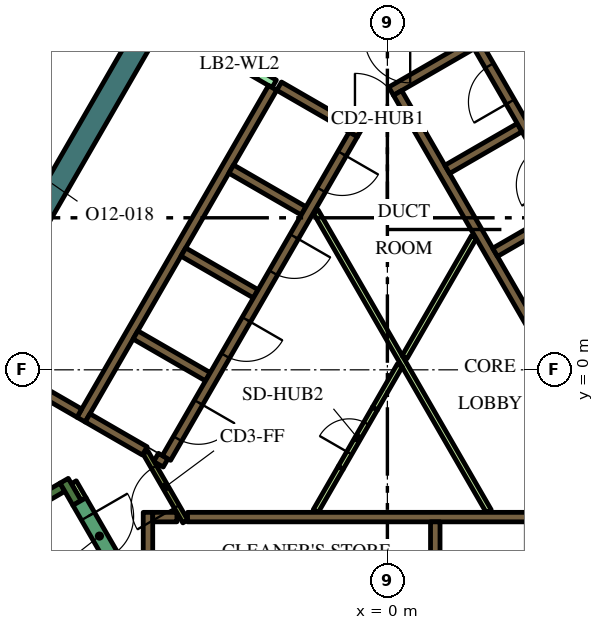
"""IFC4 building model, lengths in metres.
Left out: names, types, materials, properties, quantities, classifications, styles, units other than length and angle.
Written with IfcOpenShell. Run it as: python <this file> out.ifc"""

import sys

from ifc_helpers import new_model, si_unit, direction, frame, frame_2d, origin, place, context, subcontext, project, spatial, polyline, rectangle, outline, extrude, element, fill, save


model = new_model("IFC4")
c1 = context("Model", 3, precision=1e-05, world=origin(), true_north=direction((0.0, 1.0)))
c2 = subcontext(c1, "Body", "Model", "MODEL_VIEW")
j1 = project(units=[si_unit("LENGTHUNIT", "METRE"), si_unit("PLANEANGLEUNIT", "RADIAN")], contexts=[c1])
p1 = place(None, origin())
s1 = spatial("IfcSite", under=j1, at=p1, CompositionType="ELEMENT")
p2 = place(p1, origin())
s2 = spatial("IfcBuilding", under=s1, at=p2, CompositionType="ELEMENT")
p3 = place(p2, frame((0.0, 0.0, 279.6)))
s3 = spatial("IfcBuildingStorey", under=s2, at=p3, CompositionType="ELEMENT", Elevation=279.6)
p4 = place(p3, frame((1.989, 16.456, 0.0), z_axis=(0.0, 0.0, 1.0), x_axis=(0.49999102663, -0.8660305845, 0.0)))
e1 = element("IfcWall", 1, at=p4, inside=s3, PredefinedType="SOLIDWALL", context=c2, shape_type="SweptSolid", body=[
    extrude(rectangle(XDim=12.406, YDim=0.6, at=frame_2d((6.203, 0.0))), origin(), (0.0, 0.0, 1.0), 4.2),
])
p5 = place(p3, frame((-4.234, 12.566, 0.0), z_axis=(0.0, 0.0, 1.0), x_axis=(-0.499998841866, -0.866026072432, 0.0)))
e2 = element("IfcWall", 2, at=p5, inside=s3, PredefinedType="SOLIDWALL", context=c2, shape_type="SweptSolid", body=[
    extrude(rectangle(XDim=16.694, YDim=0.6, at=frame_2d((8.347, 0.0))), origin(), (0.0, 0.0, 1.0), 4.2),
])
p6 = place(p3, frame((-14.44, -6.49, 0.0), z_axis=(0.0, 0.0, 1.0), x_axis=(0.866022966069, 0.500004222222, 0.0)))
e3 = element("IfcWall", 3, at=p6, inside=s3, PredefinedType="SOLIDWALL", context=c2, shape_type="SweptSolid", body=[
    extrude(rectangle(XDim=6.8, YDim=0.25, at=frame_2d((3.4, 0.0))), origin(), (0.0, 0.0, 1.0), 4.2),
])
p7 = place(p3, frame((-8.168, -3.503, 0.0), z_axis=(0.0, 0.0, 1.0), x_axis=(-0.499952099219, 0.866053057547, 0.0)))
e4 = element("IfcWall", 4, at=p7, inside=s3, PredefinedType="SOLIDWALL", context=c2, shape_type="SweptSolid", body=[
    extrude(rectangle(XDim=0.675, YDim=0.25, at=frame_2d((0.337, 0.0))), origin(), (0.0, 0.0, 1.0), 4.2),
])
p8 = place(p3, frame((-5.259, -3.875, 0.0), z_axis=(0.0, 0.0, 1.0), x_axis=(1.0, 0.0, 0.0)))
e5 = element("IfcWall", 5, at=p8, inside=s3, PredefinedType="SOLIDWALL", context=c2, shape_type="SweptSolid", body=[
    extrude(rectangle(XDim=10.489, YDim=0.25, at=frame_2d((5.244, 0.0))), origin(), (0.0, 0.0, 1.0), 4.2),
])
p9 = place(p3, frame((1.26, -4.0, 0.0), z_axis=(0.0, 0.0, 1.0), x_axis=(0.0, -1.0, 0.0)))
e6 = element("IfcWall", 6, at=p9, inside=s3, PredefinedType="SOLIDWALL", context=c2, shape_type="SweptSolid", body=[
    extrude(rectangle(XDim=2.2, YDim=0.25, at=frame_2d((1.1, 0.0))), origin(), (0.0, 0.0, 1.0), 4.2),
])
p10 = place(p3, frame((-6.3, -7.125, 0.0), z_axis=(0.0, 0.0, 1.0), x_axis=(0.0, 1.0, 0.0)))
e7 = element("IfcWall", 7, at=p10, inside=s3, PredefinedType="SOLIDWALL", context=c2, shape_type="SweptSolid", body=[
    extrude(rectangle(XDim=3.375, YDim=0.25, at=frame_2d((1.687, 0.0))), origin(), (0.0, 0.0, 1.0), 4.2),
])
p11 = place(p3, frame((-6.175, -3.875, 0.0), z_axis=(0.0, 0.0, 1.0), x_axis=(1.0, 0.0, 0.0)))
e8 = element("IfcWall", 8, at=p11, inside=s3, PredefinedType="SOLIDWALL", context=c2, shape_type="SweptSolid", body=[
    extrude(rectangle(XDim=0.637, YDim=0.25, at=frame_2d((0.318, 0.0))), origin(), (0.0, 0.0, 1.0), 4.2),
])
p12 = place(p3, frame((3.1, 9.064, 0.0), z_axis=(0.0, 0.0, 1.0), x_axis=(-0.866033137035, -0.499986605379, 0.0)))
e9 = element("IfcWall", 9, at=p12, inside=s3, PredefinedType="SOLIDWALL", context=c2, shape_type="SweptSolid", body=[
    extrude(rectangle(XDim=3.467, YDim=0.25, at=frame_2d((1.733, 0.0))), origin(), (0.0, 0.0, 1.0), 4.2),
])
p13 = place(p3, frame((0.268, 7.285, 0.0), z_axis=(0.0, 0.0, 1.0), x_axis=(0.500098681536, -0.865968422476, 0.0)))
e10 = element("IfcWall", 10, at=p13, inside=s3, PredefinedType="SOLIDWALL", context=c2, shape_type="SweptSolid", body=[
    extrude(rectangle(XDim=0.636, YDim=0.25, at=frame_2d((0.318, 0.0))), origin(), (0.0, 0.0, 1.0), 4.2),
])
p14 = place(p3, frame((5.97, -2.591, 0.0), z_axis=(0.0, 0.0, 1.0), x_axis=(-0.499994469932, 0.866028596547, 0.0)))
e11 = element("IfcWall", 11, at=p14, inside=s3, PredefinedType="SOLIDWALL", context=c2, shape_type="SweptSolid", body=[
    extrude(rectangle(XDim=10.488, YDim=0.25, at=frame_2d((5.244, 0.0))), origin(), (0.0, 0.0, 1.0), 4.2),
])
p15 = place(p3, frame((1.574, 5.274, 0.0), z_axis=(0.0, 0.0, 1.0), x_axis=(0.866028486751, 0.499994660107, 0.0)))
e12 = element("IfcWall", 12, at=p15, inside=s3, PredefinedType="SOLIDWALL", context=c2, shape_type="SweptSolid", body=[
    extrude(rectangle(XDim=2.2, YDim=0.25, at=frame_2d((1.1, 0.0))), origin(), (0.0, 0.0, 1.0), 4.2),
])
p16 = place(p3, frame((2.834, 3.091, 0.0), z_axis=(0.0, 0.0, 1.0), x_axis=(0.866008176907, 0.50002983664, 0.0)))
e13 = element("IfcWall", 13, at=p16, inside=s3, PredefinedType="SOLIDWALL", context=c2, shape_type="SweptSolid", body=[
    extrude(rectangle(XDim=2.2, YDim=0.25, at=frame_2d((1.1, 0.0))), origin(), (0.0, 0.0, 1.0), 4.2),
])
p17 = place(p3, frame((-3.02, 7.419, 0.0), z_axis=(0.0, 0.0, 1.0), x_axis=(-0.500022956343, -0.866012149528, 0.0)))
e14 = element("IfcWall", 14, at=p17, inside=s3, PredefinedType="SOLIDWALL", context=c2, shape_type="SweptSolid", body=[
    extrude(rectangle(XDim=10.08, YDim=0.25, at=frame_2d((5.04, 0.0))), origin(), (0.0, 0.0, 1.0), 4.2),
])
p18 = place(p3, origin())
e15 = element("IfcWall", 15, at=p18, inside=s3, PredefinedType="SOLIDWALL", context=c2, shape_type="SweptSolid", body=[
    extrude(outline(polyline([(-2.912, 7.356), (-2.787, 7.573), (-1.232, 6.675), (-1.303, 6.675), (-1.304, 6.675), (-1.304, 6.675), (-1.304, 6.525), (-1.304, 6.525), (-1.303, 6.525), (-0.971, 6.525), (-0.665, 6.348), (-0.79, 6.132), (-1.007, 6.257), (-1.007, 6.257), (-2.912, 7.356)])), origin(), (0.0, 0.0, 1.0), 4.2),
])
for number, where, z_axis, x_axis in (
    (16, (-2.204, 4.182, 0.0), (0.0, 0.0, 1.0), (-0.866, 0.5, 0.0)),
    (17, (-5.369, 3.1, 0.0), (0.0, 0.0, 1.0), (0.866, -0.5, 0.0)),
    (18, (-4.724, -0.182, 0.0), (0.0, 0.0, 1.0), (-0.866, 0.5, 0.0)),
):
    element("IfcWall", number, at=place(p3, frame(where, z_axis=z_axis, x_axis=x_axis)), inside=s3, PredefinedType="SOLIDWALL", context=c2, shape_type="SweptSolid", body=[
        extrude(rectangle(XDim=2.2, YDim=0.25, at=frame_2d((1.1, 0.0))), origin(), (0.0, 0.0, 1.0), 4.2),
    ])
p19 = place(p3, frame((-6.088, -2.305, 0.0), z_axis=(0.0, 0.0, 1.0), x_axis=(0.866059450854, -0.499941024108, 0.0)))
e19 = element("IfcWall", 19, at=p19, inside=s3, PredefinedType="SOLIDWALL", context=c2, shape_type="SweptSolid", body=[
    extrude(rectangle(XDim=0.29, YDim=0.25, at=frame_2d((0.145, 0.0))), origin(), (0.0, 0.0, 1.0), 4.2),
])
p20 = place(p3, frame((-7.889, -1.265, 0.0), z_axis=(0.0, 0.0, 1.0), x_axis=(0.865986741702, -0.500066958712, 0.0)))
e20 = element("IfcWall", 20, at=p20, inside=s3, PredefinedType="SOLIDWALL", context=c2, shape_type="SweptSolid", body=[
    extrude(rectangle(XDim=1.738, YDim=0.25, at=frame_2d((0.869, 0.0))), origin(), (0.0, 0.0, 1.0), 4.2),
])
p21 = place(p3, frame((-8.106, -1.14, 0.0), z_axis=(0.0, 0.0, 1.0), x_axis=(-0.866008981251, 0.500028443584, 0.0)))
e21 = element("IfcWall", 21, at=p21, inside=s3, PredefinedType="SOLIDWALL", context=c2, shape_type="SweptSolid", body=[
    extrude(rectangle(XDim=3.2, YDim=0.25, at=frame_2d((1.6, 0.0))), origin(), (0.0, 0.0, 1.0), 4.2),
])
p22 = place(p3, frame((-8.252, -2.958, 0.0), z_axis=(0.0, 0.0, 1.0), x_axis=(0.500174715838, -0.865924508047, 0.0)))
e22 = element("IfcWall", 22, at=p22, inside=s3, PredefinedType="PARTITIONING", context=c2, shape_type="SweptSolid", body=[
    extrude(rectangle(XDim=0.514, YDim=0.15, at=frame_2d((0.257, 0.0))), origin(), (0.0, 0.0, 1.0), 3.55),
])
p23 = place(p3, frame((-1.887, 4.168, 0.0), z_axis=(0.0, 0.0, 1.0), x_axis=(0.499997069472, -0.866027095719, 0.0)))
e23 = element("IfcWall", 23, at=p23, inside=s3, PredefinedType="PARTITIONING", context=c2, shape_type="SweptSolid", body=[
    extrude(rectangle(XDim=9.106, YDim=0.15, at=frame_2d((4.553, 0.0))), origin(), (0.0, 0.0, 1.0), 3.55),
])
p24 = place(p3, frame((-0.329, -1.021, 0.0), z_axis=(0.0, 0.0, 1.0), x_axis=(0.500033191285, 0.866006239939, 0.0)))
e24 = element("IfcWall", 24, at=p24, inside=s3, PredefinedType="PARTITIONING", context=c2, shape_type="SweptSolid", body=[
    extrude(rectangle(XDim=1.315, YDim=0.15, at=frame_2d((0.657, 0.0))), origin(), (0.0, 0.0, 1.0), 3.55),
])
p25 = place(p3, frame((2.277, 3.493, 0.0), z_axis=(0.0, 0.0, 1.0), x_axis=(-0.499994550825, -0.866028549844, 0.0)))
e25 = element("IfcWall", 25, at=p25, inside=s3, PredefinedType="PARTITIONING", context=c2, shape_type="SweptSolid", body=[
    extrude(rectangle(XDim=3.65, YDim=0.15, at=frame_2d((1.825, 0.0))), origin(), (0.0, 0.0, 1.0), 3.55),
])
p26 = place(p3, frame((-1.887, -3.718, 0.0), z_axis=(0.0, 0.0, 1.0), x_axis=(0.500033191285, 0.866006239939, 0.0)))
e26 = element("IfcWall", 26, at=p26, inside=s3, PredefinedType="PARTITIONING", context=c2, shape_type="SweptSolid", body=[
    extrude(rectangle(XDim=1.315, YDim=0.15, at=frame_2d((0.657, 0.0))), origin(), (0.0, 0.0, 1.0), 3.55),
])
p27 = place(p3, frame((8.565, -2.185, 0.0), z_axis=(0.0, 0.0, 1.0), x_axis=(-0.499997954832, 0.866026584559, 0.0)))
e27 = element("IfcWall", 27, at=p27, inside=s3, PredefinedType="SOLIDWALL", context=c2, shape_type="SweptSolid", body=[
    extrude(rectangle(XDim=12.35, YDim=0.25, at=frame_2d((6.175, 0.0))), origin(), (0.0, 0.0, 1.0), 4.2),
])
p28 = place(p27, frame((0.685, 0.0, 0.0)))
e28 = element("IfcOpeningElement", 28, at=p28, cuts=e27, PredefinedType="OPENING", context=c2, shape_type="SweptSolid", body=[
    extrude(rectangle(XDim=0.9, YDim=2.1, at=frame_2d((0.45, 1.05))), frame((0.0, 0.135, 0.0), z_axis=(0.0, -1.0, 0.0), x_axis=(1.0, 0.0, 0.0)), (0.0, 0.0, 1.0), 0.27),
])
p29 = place(p27, frame((3.105, 0.0, 0.0)))
e29 = element("IfcOpeningElement", 29, at=p29, cuts=e27, PredefinedType="OPENING", context=c2, shape_type="SweptSolid", body=[
    extrude(rectangle(XDim=1.1, YDim=2.1, at=frame_2d((0.55, 1.05))), frame((0.0, 0.135, 0.0), z_axis=(0.0, -1.0, 0.0), x_axis=(1.0, 0.0, 0.0)), (0.0, 0.0, 1.0), 0.27),
])
p30 = place(p27, frame((5.625, 0.0, 0.0)))
e30 = element("IfcOpeningElement", 30, at=p30, cuts=e27, PredefinedType="OPENING", context=c2, shape_type="SweptSolid", body=[
    extrude(rectangle(XDim=1.1, YDim=2.1, at=frame_2d((0.55, 1.05))), frame((0.0, 0.135, 0.0), z_axis=(0.0, -1.0, 0.0), x_axis=(1.0, 0.0, 0.0)), (0.0, 0.0, 1.0), 0.27),
])
p31 = place(p27, frame((8.145, 0.0, 0.0)))
e31 = element("IfcOpeningElement", 31, at=p31, cuts=e27, PredefinedType="OPENING", context=c2, shape_type="SweptSolid", body=[
    extrude(rectangle(XDim=1.1, YDim=2.1, at=frame_2d((0.55, 1.05))), frame((0.0, 0.135, 0.0), z_axis=(0.0, -1.0, 0.0), x_axis=(1.0, 0.0, 0.0)), (0.0, 0.0, 1.0), 0.27),
])
p32 = place(p27, frame((10.665, 0.0, 0.0)))
e32 = element("IfcOpeningElement", 32, at=p32, cuts=e27, PredefinedType="OPENING", context=c2, shape_type="SweptSolid", body=[
    extrude(rectangle(XDim=1.1, YDim=2.1, at=frame_2d((0.55, 1.05))), frame((0.0, 0.135, 0.0), z_axis=(0.0, -1.0, 0.0), x_axis=(1.0, 0.0, 0.0)), (0.0, 0.0, 1.0), 0.27),
])
p33 = place(p3, frame((-0.898, 6.194, 0.0), z_axis=(0.0, 0.0, 1.0), x_axis=(-0.499996202215, -0.866027596426, 0.0)))
e33 = element("IfcWall", 33, at=p33, inside=s3, PredefinedType="SOLIDWALL", context=c2, shape_type="SweptSolid", body=[
    extrude(rectangle(XDim=9.83, YDim=0.25, at=frame_2d((4.915, 0.0))), origin(), (0.0, 0.0, 1.0), 4.2),
])
p34 = place(p33, frame((0.585, 0.0, 0.0)))
e34 = element("IfcOpeningElement", 34, at=p34, cuts=e33, PredefinedType="OPENING", context=c2, shape_type="SweptSolid", body=[
    extrude(rectangle(XDim=1.1, YDim=2.1, at=frame_2d((0.55, 1.05))), frame((0.0, 0.135, 0.0), z_axis=(0.0, -1.0, 0.0), x_axis=(1.0, 0.0, 0.0)), (0.0, 0.0, 1.0), 0.27),
])
p35 = place(p33, frame((3.105, 0.0, 0.0)))
e35 = element("IfcOpeningElement", 35, at=p35, cuts=e33, PredefinedType="OPENING", context=c2, shape_type="SweptSolid", body=[
    extrude(rectangle(XDim=1.1, YDim=2.1, at=frame_2d((0.55, 1.05))), frame((0.0, 0.135, 0.0), z_axis=(0.0, -1.0, 0.0), x_axis=(1.0, 0.0, 0.0)), (0.0, 0.0, 1.0), 0.27),
])
p36 = place(p33, frame((5.625, 0.0, 0.0)))
e36 = element("IfcOpeningElement", 36, at=p36, cuts=e33, PredefinedType="OPENING", context=c2, shape_type="SweptSolid", body=[
    extrude(rectangle(XDim=1.1, YDim=2.1, at=frame_2d((0.55, 1.05))), frame((0.0, 0.135, 0.0), z_axis=(0.0, -1.0, 0.0), x_axis=(1.0, 0.0, 0.0)), (0.0, 0.0, 1.0), 0.27),
])
p37 = place(p33, frame((8.145, 0.0, 0.0)))
e37 = element("IfcOpeningElement", 37, at=p37, cuts=e33, PredefinedType="OPENING", context=c2, shape_type="SweptSolid", body=[
    extrude(rectangle(XDim=1.1, YDim=2.1, at=frame_2d((0.55, 1.05))), frame((0.0, 0.135, 0.0), z_axis=(0.0, -1.0, 0.0), x_axis=(1.0, 0.0, 0.0)), (0.0, 0.0, 1.0), 0.27),
])
p38 = place(p3, frame((-8.103, -3.466, 0.0), z_axis=(0.0, 0.0, 1.0), x_axis=(0.500078061341, -0.865980330357, 0.0)))
e38 = element("IfcWall", 38, at=p38, inside=s3, PredefinedType="SOLIDWALL", context=c2, shape_type="SweptSolid", body=[
    extrude(rectangle(XDim=2.1, YDim=0.4, at=frame_2d((1.05, 0.0))), origin(), (0.0, 0.0, 1.0), 4.2),
])
p39 = place(p38, frame((0.45, 0.0, 0.0)))
e39 = element("IfcOpeningElement", 39, at=p39, cuts=e38, PredefinedType="OPENING", context=c2, shape_type="SweptSolid", body=[
    extrude(rectangle(XDim=1.2, YDim=2.1, at=frame_2d((0.6, 1.05))), frame((0.0, 0.21, 0.0), z_axis=(0.0, -1.0, 0.0), x_axis=(1.0, 0.0, 0.0)), (0.0, 0.0, 1.0), 0.42),
])
p40 = place(p3, frame((-1.303, 6.6, 0.0), z_axis=(0.0, 0.0, 1.0), x_axis=(1.0, 0.0, 0.0)))
e40 = element("IfcWall", 40, at=p40, inside=s3, PredefinedType="PARTITIONING", context=c2, shape_type="SweptSolid", body=[
    extrude(rectangle(XDim=2.1, YDim=0.15, at=frame_2d((1.05, 0.0))), origin(), (0.0, 0.0, 1.0), 4.2),
])
p41 = place(p40, frame((0.45, 0.0, 0.0)))
e41 = element("IfcOpeningElement", 41, at=p41, cuts=e40, PredefinedType="OPENING", context=c2, shape_type="SweptSolid", body=[
    extrude(rectangle(XDim=1.2, YDim=2.1, at=frame_2d((0.6, 1.05))), frame((0.0, 0.085, 0.0), z_axis=(0.0, -1.0, 0.0), x_axis=(1.0, 0.0, 0.0)), (0.0, 0.0, 1.0), 0.17),
])
p42 = place(p3, frame((-5.317, -3.99, 0.0), z_axis=(0.0, 0.0, 1.0), x_axis=(-0.500027713859, 0.866009402589, 0.0)))
e42 = element("IfcWall", 42, at=p42, inside=s3, PredefinedType="PARTITIONING", context=c2, shape_type="SweptSolid", body=[
    extrude(rectangle(XDim=2.1, YDim=0.15, at=frame_2d((1.05, 0.0))), origin(), (0.0, 0.0, 1.0), 4.2),
])
p43 = place(p42, frame((0.45, 0.0, 0.0)))
e43 = element("IfcOpeningElement", 43, at=p43, cuts=e42, PredefinedType="OPENING", context=c2, shape_type="SweptSolid", body=[
    extrude(rectangle(XDim=1.2, YDim=2.1, at=frame_2d((0.6, 1.05))), frame((0.0, 0.085, 0.0), z_axis=(0.0, -1.0, 0.0), x_axis=(1.0, 0.0, 0.0)), (0.0, 0.0, 1.0), 0.17),
])
p44 = place(p3, frame((-4.796, 8.575, 0.0), z_axis=(0.0, 0.0, 1.0), x_axis=(0.866009402589, -0.500027713859, 0.0)))
e44 = element("IfcWall", 44, at=p44, inside=s3, PredefinedType="PARTITIONING", context=c2, shape_type="SweptSolid", body=[
    extrude(rectangle(XDim=2.1, YDim=0.226, at=frame_2d((1.05, 0.0))), origin(), (0.0, 0.0, 1.0), 3.55),
])
p45 = place(p44, frame((0.45, 0.0, 0.0)))
e45 = element("IfcOpeningElement", 45, at=p45, cuts=e44, PredefinedType="OPENING", context=c2, shape_type="SweptSolid", body=[
    extrude(rectangle(XDim=1.2, YDim=2.1, at=frame_2d((0.6, 1.05))), frame((0.0, 0.123, 0.0), z_axis=(0.0, -1.0, 0.0), x_axis=(1.0, 0.0, 0.0)), (0.0, 0.0, 1.0), 0.246),
])
p46 = place(p3, frame((-1.229, -2.579, 0.0), z_axis=(0.0, 0.0, 1.0), x_axis=(0.500062916607, 0.865989075817, 0.0)))
e46 = element("IfcWall", 46, at=p46, inside=s3, PredefinedType="PARTITIONING", context=c2, shape_type="SweptSolid", body=[
    extrude(rectangle(XDim=1.8, YDim=0.15, at=frame_2d((0.9, 0.0))), origin(), (0.0, 0.0, 1.0), 3.55),
])
p47 = place(p46, frame((0.45, 0.0, 0.0)))
e47 = element("IfcOpeningElement", 47, at=p47, cuts=e46, PredefinedType="OPENING", context=c2, shape_type="SweptSolid", body=[
    extrude(rectangle(XDim=0.9, YDim=2.1, at=frame_2d((0.45, 1.05))), frame((0.0, 0.085, 0.0), z_axis=(0.0, -1.0, 0.0), x_axis=(1.0, 0.0, 0.0)), (0.0, 0.0, 1.0), 0.17),
])
p48 = place(p3, frame((-7.436, 11.221, 0.0), z_axis=(0.0, 0.0, 1.0), x_axis=(-0.49999894854, -0.866026010844, 0.0)))
e48 = element("IfcWall", 48, at=p48, inside=s3, PredefinedType="PARTITIONING", context=c2, shape_type="SweptSolid", body=[
    extrude(rectangle(XDim=12.0, YDim=0.2, at=frame_2d((6.0, 0.0))), origin(), (0.0, 0.0, 1.0), 3.55),
])
p49 = place(p48, frame((5.5, 0.0, 0.0)))
e49 = element("IfcOpeningElement", 49, at=p49, cuts=e48, PredefinedType="OPENING", context=c2, shape_type="SweptSolid", body=[
    extrude(rectangle(XDim=1.0, YDim=2.1, at=frame_2d((0.5, 1.05))), frame((0.0, 0.11, 0.0), z_axis=(0.0, -1.0, 0.0), x_axis=(1.0, 0.0, 0.0)), (0.0, 0.0, 1.0), 0.22),
])
p50 = place(p32, origin())
e50 = element("IfcDoor", 50, at=p50, inside=s3, OperationType="DOUBLE_DOOR_SLIDING", PredefinedType="DOOR", context=c2, shape_type="SweptSolid", body=[
    extrude(rectangle(XDim=1.1, YDim=2.1, at=frame_2d((0.55, 1.05))), frame((0.0, 0.025, 0.0), z_axis=(0.0, -1.0, 0.0), x_axis=(1.0, 0.0, 0.0)), (0.0, 0.0, 1.0), 0.05),
])
fill(e32, e50)
p51 = place(p34, origin())
e51 = element("IfcDoor", 51, at=p51, inside=s3, OperationType="DOUBLE_DOOR_SLIDING", PredefinedType="DOOR", context=c2, shape_type="SweptSolid", body=[
    extrude(rectangle(XDim=1.1, YDim=2.1, at=frame_2d((0.55, 1.05))), frame((0.0, 0.025, 0.0), z_axis=(0.0, -1.0, 0.0), x_axis=(1.0, 0.0, 0.0)), (0.0, 0.0, 1.0), 0.05),
])
fill(e34, e51)
p52 = place(p35, origin())
e52 = element("IfcDoor", 52, at=p52, inside=s3, OperationType="DOUBLE_DOOR_SLIDING", PredefinedType="DOOR", context=c2, shape_type="SweptSolid", body=[
    extrude(rectangle(XDim=1.1, YDim=2.1, at=frame_2d((0.55, 1.05))), frame((0.0, 0.025, 0.0), z_axis=(0.0, -1.0, 0.0), x_axis=(1.0, 0.0, 0.0)), (0.0, 0.0, 1.0), 0.05),
])
fill(e35, e52)
p53 = place(p36, origin())
e53 = element("IfcDoor", 53, at=p53, inside=s3, OperationType="DOUBLE_DOOR_SLIDING", PredefinedType="DOOR", context=c2, shape_type="SweptSolid", body=[
    extrude(rectangle(XDim=1.1, YDim=2.1, at=frame_2d((0.55, 1.05))), frame((0.0, 0.025, 0.0), z_axis=(0.0, -1.0, 0.0), x_axis=(1.0, 0.0, 0.0)), (0.0, 0.0, 1.0), 0.05),
])
fill(e36, e53)
p54 = place(p37, origin())
e54 = element("IfcDoor", 54, at=p54, inside=s3, OperationType="DOUBLE_DOOR_SLIDING", PredefinedType="DOOR", context=c2, shape_type="SweptSolid", body=[
    extrude(rectangle(XDim=1.1, YDim=2.1, at=frame_2d((0.55, 1.05))), frame((0.0, 0.025, 0.0), z_axis=(0.0, -1.0, 0.0), x_axis=(1.0, 0.0, 0.0)), (0.0, 0.0, 1.0), 0.05),
])
fill(e37, e54)
p55 = place(p39, origin())
e55 = element("IfcDoor", 55, at=p55, inside=s3, OperationType="SINGLE_SWING_LEFT", PredefinedType="DOOR", context=c2, shape_type="SweptSolid", body=[
    extrude(rectangle(XDim=1.2, YDim=2.1, at=frame_2d((0.6, 1.05))), frame((0.0, 0.025, 0.0), z_axis=(0.0, -1.0, 0.0), x_axis=(1.0, 0.0, 0.0)), (0.0, 0.0, 1.0), 0.05),
])
fill(e39, e55)
p56 = place(p41, origin())
e56 = element("IfcDoor", 56, at=p56, inside=s3, OperationType="SINGLE_SWING_LEFT", PredefinedType="DOOR", context=c2, shape_type="SweptSolid", body=[
    extrude(rectangle(XDim=1.2, YDim=2.1, at=frame_2d((0.6, 1.05))), frame((0.0, 0.025, 0.0), z_axis=(0.0, -1.0, 0.0), x_axis=(1.0, 0.0, 0.0)), (0.0, 0.0, 1.0), 0.05),
])
fill(e41, e56)
p57 = place(p43, origin())
e57 = element("IfcDoor", 57, at=p57, inside=s3, OperationType="SINGLE_SWING_LEFT", PredefinedType="DOOR", context=c2, shape_type="SweptSolid", body=[
    extrude(rectangle(XDim=1.2, YDim=2.1, at=frame_2d((0.6, 1.05))), frame((0.0, 0.025, 0.0), z_axis=(0.0, -1.0, 0.0), x_axis=(1.0, 0.0, 0.0)), (0.0, 0.0, 1.0), 0.05),
])
fill(e43, e57)
p58 = place(p45, origin())
e58 = element("IfcDoor", 58, at=p58, inside=s3, OperationType="SINGLE_SWING_LEFT", PredefinedType="DOOR", context=c2, shape_type="SweptSolid", body=[
    extrude(rectangle(XDim=1.2, YDim=2.1, at=frame_2d((0.6, 1.05))), frame((0.0, 0.025, 0.0), z_axis=(0.0, -1.0, 0.0), x_axis=(1.0, 0.0, 0.0)), (0.0, 0.0, 1.0), 0.05),
])
fill(e45, e58)
p59 = place(p47, origin())
e59 = element("IfcDoor", 59, at=p59, inside=s3, OperationType="SINGLE_SWING_LEFT", PredefinedType="DOOR", context=c2, shape_type="SweptSolid", body=[
    extrude(rectangle(XDim=0.9, YDim=2.1, at=frame_2d((0.45, 1.05))), frame((0.0, 0.025, 0.0), z_axis=(0.0, -1.0, 0.0), x_axis=(1.0, 0.0, 0.0)), (0.0, 0.0, 1.0), 0.05),
])
fill(e47, e59)
save(model, sys.argv[1])
